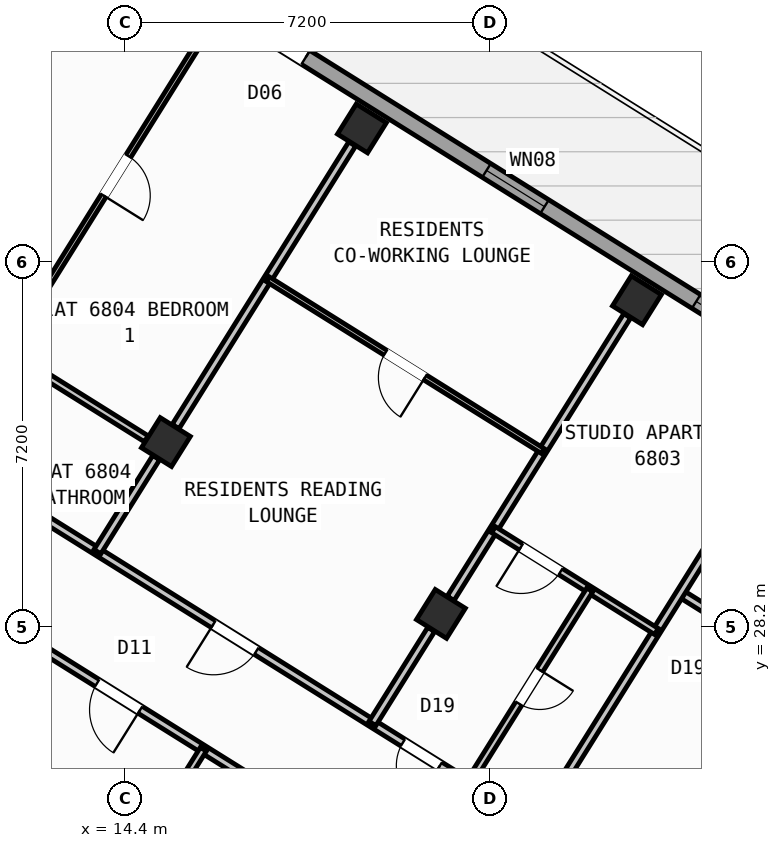
"""IFC4 building model, lengths in metres.
Left out: names, types, materials, properties, quantities, classifications, styles, units other than length and angle.
Written with IfcOpenShell. Run it as: python <this file> out.ifc"""

import sys

from ifc_helpers import new_model, si_unit, direction, frame, frame_2d, origin, origin_2d, place, context, subcontext, project, spatial, rectangle, hollow_rectangle, extrude, source, transform, mapped, element, fill, save


model = new_model("IFC4")
c1 = context("Model", 3, precision=1e-05, world=origin(), true_north=direction((0.0, 1.0)))
c2 = subcontext(c1, "Body", "Model", "MODEL_VIEW")
j1 = project(units=[si_unit("LENGTHUNIT", "METRE"), si_unit("PLANEANGLEUNIT", "RADIAN")], contexts=[c1])
p1 = place(None, origin())
s1 = spatial("IfcSite", under=j1, at=p1, CompositionType="ELEMENT")
p2 = place(p1, origin())
s2 = spatial("IfcBuilding", under=s1, at=p2, CompositionType="ELEMENT")
p3 = place(p2, frame((0.0, 0.0, 270.0)))
s3 = spatial("IfcBuildingStorey", under=s2, at=p3, CompositionType="ELEMENT", Elevation=270.0)
m1 = source(origin(), c2, "Body", "SweptSolid", [
    extrude(hollow_rectangle(XDim=0.7, YDim=0.7, WallThickness=0.028, at=origin_2d()), origin(), (0.0, 0.0, 1.0), 3.6),
])
for number, where, z_axis, x_axis in (
    (1, (24.5, 34.643, 0.0), (0.0, 0.0, 1.0), (-0.848, 0.53, 0.0)),
    (2, (20.632, 28.452, 0.0), (0.0, 0.0, 1.0), (-0.848, 0.53, 0.0)),
    (3, (19.073, 38.034, 0.0), (0.0, 0.0, 1.0), (-0.848, 0.53, 0.0)),
    (4, (15.205, 31.844, 0.0), (0.0, 0.0, 1.0), (-0.848, 0.53, 0.0)),
):
    element("IfcColumn", number, at=place(p3, frame(where, z_axis=z_axis, x_axis=x_axis)), inside=s3, PredefinedType="COLUMN", context=c2, shape_type="MappedRepresentation", body=[
        mapped(m1, transform((0.0, 0.0, 0.0), scale=1.0)),
    ])
p4 = place(p3, frame((2.415, 23.452, 0.0), z_axis=(0.0, 0.0, 1.0), x_axis=(0.52991049553, 0.848053575387, 0.0)))
e5 = element("IfcWall", 5, at=p4, inside=s3, PredefinedType="STANDARD", context=c2, shape_type="SweptSolid", body=[
    extrude(rectangle(XDim=21.587, YDim=0.32, at=frame_2d((10.794, 0.0))), origin(), (0.0, 0.0, 1.0), 2.875),
])
p5 = place(p4, frame((2.606, 0.0, 0.9)))
e6 = element("IfcOpeningElement", 6, at=p5, cuts=e5, PredefinedType="OPENING", context=c2, shape_type="SweptSolid", body=[
    extrude(rectangle(XDim=1.65, YDim=1.45, at=frame_2d((0.825, 0.725))), frame((0.0, 0.17, 0.0), z_axis=(0.0, -1.0, 0.0), x_axis=(1.0, 0.0, 0.0)), (0.0, 0.0, 1.0), 0.34),
])
p6 = place(p4, frame((7.504, 0.0, 1.0)))
e7 = element("IfcOpeningElement", 7, at=p6, cuts=e5, PredefinedType="OPENING", context=c2, shape_type="SweptSolid", body=[
    extrude(rectangle(XDim=0.9, YDim=1.25, at=frame_2d((0.45, 0.625))), frame((0.0, 0.17, 0.0), z_axis=(0.0, -1.0, 0.0), x_axis=(1.0, 0.0, 0.0)), (0.0, 0.0, 1.0), 0.34),
])
p7 = place(p4, frame((12.084, 0.0, 1.0)))
e8 = element("IfcOpeningElement", 8, at=p7, cuts=e5, PredefinedType="OPENING", context=c2, shape_type="SweptSolid", body=[
    extrude(rectangle(XDim=0.9, YDim=1.25, at=frame_2d((0.45, 0.625))), frame((0.0, 0.17, 0.0), z_axis=(0.0, -1.0, 0.0), x_axis=(1.0, 0.0, 0.0)), (0.0, 0.0, 1.0), 0.34),
])
p8 = place(p4, frame((15.619, 0.0, 1.0)))
e9 = element("IfcOpeningElement", 9, at=p8, cuts=e5, PredefinedType="OPENING", context=c2, shape_type="SweptSolid", body=[
    extrude(rectangle(XDim=0.9, YDim=1.25, at=frame_2d((0.45, 0.625))), frame((0.0, 0.17, 0.0), z_axis=(0.0, -1.0, 0.0), x_axis=(1.0, 0.0, 0.0)), (0.0, 0.0, 1.0), 0.34),
])
p9 = place(p4, frame((18.569, 0.0, 1.0)))
e10 = element("IfcOpeningElement", 10, at=p9, cuts=e5, PredefinedType="OPENING", context=c2, shape_type="SweptSolid", body=[
    extrude(rectangle(XDim=0.9, YDim=1.25, at=frame_2d((0.45, 0.625))), frame((0.0, 0.17, 0.0), z_axis=(0.0, -1.0, 0.0), x_axis=(1.0, 0.0, 0.0)), (0.0, 0.0, 1.0), 0.34),
])
p10 = place(p3, frame((14.138, 41.825, 0.0), z_axis=(0.0, 0.0, 1.0), x_axis=(0.848046498049, -0.529921821731, 0.0)))
e11 = element("IfcWall", 11, at=p10, inside=s3, PredefinedType="STANDARD", context=c2, shape_type="SweptSolid", body=[
    extrude(rectangle(XDim=31.588, YDim=0.32, at=frame_2d((15.794, 0.0))), origin(), (0.0, 0.0, 1.0), 3.35),
])
p11 = place(p10, frame((3.46, 0.0, 0.0)))
e12 = element("IfcOpeningElement", 12, at=p11, cuts=e11, PredefinedType="OPENING", context=c2, shape_type="SweptSolid", body=[
    extrude(rectangle(XDim=1.05, YDim=2.15, at=frame_2d((0.525, 1.075))), frame((0.0, 0.17, 0.0), z_axis=(0.0, -1.0, 0.0), x_axis=(1.0, 0.0, 0.0)), (0.0, 0.0, 1.0), 0.34),
])
p12 = place(p10, frame((0.831, 0.0, 1.0)))
e13 = element("IfcOpeningElement", 13, at=p12, cuts=e11, PredefinedType="OPENING", context=c2, shape_type="SweptSolid", body=[
    extrude(rectangle(XDim=0.9, YDim=1.25, at=frame_2d((0.45, 0.625))), frame((0.0, 0.17, 0.0), z_axis=(0.0, -1.0, 0.0), x_axis=(1.0, 0.0, 0.0)), (0.0, 0.0, 1.0), 0.34),
])
p13 = place(p10, frame((8.719, 0.0, 0.9)))
e14 = element("IfcOpeningElement", 14, at=p13, cuts=e11, PredefinedType="OPENING", context=c2, shape_type="SweptSolid", body=[
    extrude(rectangle(XDim=1.35, YDim=1.45, at=frame_2d((0.675, 0.725))), frame((0.0, 0.17, 0.0), z_axis=(0.0, -1.0, 0.0), x_axis=(1.0, 0.0, 0.0)), (0.0, 0.0, 1.0), 0.34),
])
p14 = place(p10, frame((13.599, 0.0, 0.95)))
e15 = element("IfcOpeningElement", 15, at=p14, cuts=e11, PredefinedType="OPENING", context=c2, shape_type="SweptSolid", body=[
    extrude(rectangle(XDim=1.95, YDim=1.35, at=frame_2d((0.975, 0.675))), frame((0.0, 0.17, 0.0), z_axis=(0.0, -1.0, 0.0), x_axis=(1.0, 0.0, 0.0)), (0.0, 0.0, 1.0), 0.34),
])
p15 = place(p10, frame((17.154, 0.0, 1.0)))
e16 = element("IfcOpeningElement", 16, at=p15, cuts=e11, PredefinedType="OPENING", context=c2, shape_type="SweptSolid", body=[
    extrude(rectangle(XDim=0.9, YDim=1.25, at=frame_2d((0.45, 0.625))), frame((0.0, 0.17, 0.0), z_axis=(0.0, -1.0, 0.0), x_axis=(1.0, 0.0, 0.0)), (0.0, 0.0, 1.0), 0.34),
])
p16 = place(p10, frame((21.719, 0.0, 0.9)))
e17 = element("IfcOpeningElement", 17, at=p16, cuts=e11, PredefinedType="OPENING", context=c2, shape_type="SweptSolid", body=[
    extrude(rectangle(XDim=1.65, YDim=1.45, at=frame_2d((0.825, 0.725))), frame((0.0, 0.17, 0.0), z_axis=(0.0, -1.0, 0.0), x_axis=(1.0, 0.0, 0.0)), (0.0, 0.0, 1.0), 0.34),
])
p17 = place(p10, frame((27.419, 0.0, 0.9)))
e18 = element("IfcOpeningElement", 18, at=p17, cuts=e11, PredefinedType="OPENING", context=c2, shape_type="SweptSolid", body=[
    extrude(rectangle(XDim=1.65, YDim=1.45, at=frame_2d((0.825, 0.725))), frame((0.0, 0.17, 0.0), z_axis=(0.0, -1.0, 0.0), x_axis=(1.0, 0.0, 0.0)), (0.0, 0.0, 1.0), 0.34),
])
p18 = place(p3, frame((27.57, 27.478, 0.0), z_axis=(0.0, 0.0, 1.0), x_axis=(-0.848050851465, 0.529914854792, 0.0)))
e19 = element("IfcWall", 19, at=p18, inside=s3, PredefinedType="PARTITIONING", context=c2, shape_type="SweptSolid", body=[
    extrude(rectangle(XDim=2.61, YDim=0.16, at=frame_2d((1.305, 0.0))), origin(), (0.0, 0.0, 1.0), 3.34),
])
p19 = place(p18, frame((0.95, 0.0, 0.0)))
e20 = element("IfcOpeningElement", 20, at=p19, cuts=e19, PredefinedType="OPENING", context=c2, shape_type="SweptSolid", body=[
    extrude(rectangle(XDim=0.86, YDim=2.05, at=frame_2d((0.43, 1.025))), frame((0.0, 0.09, 0.0), z_axis=(0.0, -1.0, 0.0), x_axis=(1.0, 0.0, 0.0)), (0.0, 0.0, 1.0), 0.18),
])
p20 = place(p3, frame((27.953, 33.016, 0.0), z_axis=(0.0, 0.0, 1.0), x_axis=(-0.529909450694, -0.848054228257, 0.0)))
e21 = element("IfcWall", 21, at=p20, inside=s3, PredefinedType="PARTITIONING", context=c2, shape_type="SweptSolid", body=[
    extrude(rectangle(XDim=10.3, YDim=0.16, at=frame_2d((5.15, 0.0))), origin(), (0.0, 0.0, 1.0), 3.34),
])
p21 = place(p3, frame((22.495, 24.281, 0.0), z_axis=(0.0, 0.0, 1.0), x_axis=(-0.848052408131, 0.529912363569, 0.0)))
e22 = element("IfcWall", 22, at=p21, inside=s3, PredefinedType="PARTITIONING", context=c2, shape_type="SweptSolid", body=[
    extrude(rectangle(XDim=16.73, YDim=0.16, at=frame_2d((8.365, 0.0))), origin(), (0.0, 0.0, 1.0), 3.34),
])
p22 = place(p21, frame((2.22, 0.0, 0.0)))
e23 = element("IfcOpeningElement", 23, at=p22, cuts=e22, PredefinedType="OPENING", context=c2, shape_type="SweptSolid", body=[
    extrude(rectangle(XDim=0.86, YDim=2.05, at=frame_2d((0.43, 1.025))), frame((0.0, 0.09, 0.0), z_axis=(0.0, -1.0, 0.0), x_axis=(1.0, 0.0, 0.0)), (0.0, 0.0, 1.0), 0.18),
])
p23 = place(p21, frame((6.49, 0.0, 0.0)))
e24 = element("IfcOpeningElement", 24, at=p23, cuts=e22, PredefinedType="OPENING", context=c2, shape_type="SweptSolid", body=[
    extrude(rectangle(XDim=1.0, YDim=2.1, at=frame_2d((0.5, 1.05))), frame((0.0, 0.09, 0.0), z_axis=(0.0, -1.0, 0.0), x_axis=(1.0, 0.0, 0.0)), (0.0, 0.0, 1.0), 0.18),
])
p24 = place(p21, frame((14.76, 0.0, 0.0)))
e25 = element("IfcOpeningElement", 25, at=p24, cuts=e22, PredefinedType="OPENING", context=c2, shape_type="SweptSolid", body=[
    extrude(rectangle(XDim=1.0, YDim=2.1, at=frame_2d((0.5, 1.05))), frame((0.0, 0.09, 0.0), z_axis=(0.0, -1.0, 0.0), x_axis=(1.0, 0.0, 0.0)), (0.0, 0.0, 1.0), 0.18),
])
p25 = place(p3, frame((21.329, 22.416, 0.0), z_axis=(0.0, 0.0, 1.0), x_axis=(-0.848052408131, 0.529912363569, 0.0)))
e26 = element("IfcWall", 26, at=p25, inside=s3, PredefinedType="PARTITIONING", context=c2, shape_type="SweptSolid", body=[
    extrude(rectangle(XDim=16.73, YDim=0.16, at=frame_2d((8.365, 0.0))), origin(), (0.0, 0.0, 1.0), 3.34),
])
p26 = place(p25, frame((1.395, 0.0, 0.0)))
e27 = element("IfcOpeningElement", 27, at=p26, cuts=e26, PredefinedType="OPENING", context=c2, shape_type="SweptSolid", body=[
    extrude(rectangle(XDim=1.0, YDim=2.1, at=frame_2d((0.5, 1.05))), frame((0.0, 0.09, 0.0), z_axis=(0.0, -1.0, 0.0), x_axis=(1.0, 0.0, 0.0)), (0.0, 0.0, 1.0), 0.18),
])
p27 = place(p25, frame((7.82, 0.0, 0.0)))
e28 = element("IfcOpeningElement", 28, at=p27, cuts=e26, PredefinedType="OPENING", context=c2, shape_type="SweptSolid", body=[
    extrude(rectangle(XDim=1.0, YDim=2.1, at=frame_2d((0.5, 1.05))), frame((0.0, 0.09, 0.0), z_axis=(0.0, -1.0, 0.0), x_axis=(1.0, 0.0, 0.0)), (0.0, 0.0, 1.0), 0.18),
])
p28 = place(p25, frame((11.14, 0.0, 0.0)))
e29 = element("IfcOpeningElement", 29, at=p28, cuts=e26, PredefinedType="OPENING", context=c2, shape_type="SweptSolid", body=[
    extrude(rectangle(XDim=1.0, YDim=2.1, at=frame_2d((0.5, 1.05))), frame((0.0, 0.09, 0.0), z_axis=(0.0, -1.0, 0.0), x_axis=(1.0, 0.0, 0.0)), (0.0, 0.0, 1.0), 0.18),
])
p29 = place(p3, frame((15.944, 25.781, 0.0), z_axis=(0.0, 0.0, 1.0), x_axis=(-0.529917480809, -0.848049210561, 0.0)))
e30 = element("IfcWall", 30, at=p29, inside=s3, PredefinedType="PLUMBINGWALL", context=c2, shape_type="SweptSolid", body=[
    extrude(rectangle(XDim=4.58, YDim=0.14, at=frame_2d((2.29, 0.0))), origin(), (0.0, 0.0, 1.0), 3.34),
])
p30 = place(p29, frame((1.9, 0.0, 0.0)))
e31 = element("IfcOpeningElement", 31, at=p30, cuts=e30, PredefinedType="OPENING", context=c2, shape_type="SweptSolid", body=[
    extrude(rectangle(XDim=0.78, YDim=2.05, at=frame_2d((0.39, 1.025))), frame((0.0, 0.08, 0.0), z_axis=(0.0, -1.0, 0.0), x_axis=(1.0, 0.0, 0.0)), (0.0, 0.0, 1.0), 0.16),
])
p31 = place(p3, frame((24.309, 34.336, 0.0), z_axis=(0.0, 0.0, 1.0), x_axis=(-0.529895484599, -0.848062954858, 0.0)))
e32 = element("IfcWall", 32, at=p31, inside=s3, PredefinedType="PARTITIONING", context=c2, shape_type="SweptSolid", body=[
    extrude(rectangle(XDim=6.576, YDim=0.16, at=frame_2d((3.288, 0.0))), origin(), (0.0, 0.0, 1.0), 2.875),
])
p32 = place(p3, frame((20.44, 28.145, 0.0), z_axis=(0.0, 0.0, 1.0), x_axis=(-0.5299186965, -0.848048450915, 0.0)))
e33 = element("IfcWall", 33, at=p32, inside=s3, PredefinedType="PARTITIONING", context=c2, shape_type="SweptSolid", body=[
    extrude(rectangle(XDim=2.188, YDim=0.16, at=frame_2d((1.094, 0.0))), origin(), (0.0, 0.0, 1.0), 2.875),
])
p33 = place(p3, frame((24.885, 28.106, 0.0), z_axis=(0.0, 0.0, 1.0), x_axis=(-0.848059820872, 0.529900500304, 0.0)))
e34 = element("IfcWall", 34, at=p33, inside=s3, PredefinedType="PLUMBINGWALL", context=c2, shape_type="SweptSolid", body=[
    extrude(rectangle(XDim=3.79, YDim=0.14, at=frame_2d((1.895, 0.0))), origin(), (0.0, 0.0, 1.0), 3.34),
])
p34 = place(p33, frame((2.23, 0.0, 0.0)))
e35 = element("IfcOpeningElement", 35, at=p34, cuts=e34, PredefinedType="OPENING", context=c2, shape_type="SweptSolid", body=[
    extrude(rectangle(XDim=0.92, YDim=2.08, at=frame_2d((0.46, 1.04))), frame((0.0, 0.08, 0.0), z_axis=(0.0, -1.0, 0.0), x_axis=(1.0, 0.0, 0.0)), (0.0, 0.0, 1.0), 0.16),
])
p35 = place(p3, frame((23.57, 28.927, 0.0), z_axis=(0.0, 0.0, 1.0), x_axis=(-0.529911350634, -0.84805304107, 0.0)))
e36 = element("IfcWall", 36, at=p35, inside=s3, PredefinedType="PLUMBINGWALL", context=c2, shape_type="SweptSolid", body=[
    extrude(rectangle(XDim=4.51, YDim=0.14, at=frame_2d((2.255, 0.0))), origin(), (0.0, 0.0, 1.0), 3.025),
])
p36 = place(p35, frame((1.865, 0.0, 0.0)))
e37 = element("IfcOpeningElement", 37, at=p36, cuts=e36, PredefinedType="OPENING", context=c2, shape_type="SweptSolid", body=[
    extrude(rectangle(XDim=0.78, YDim=2.05, at=frame_2d((0.39, 1.025))), frame((0.0, 0.08, 0.0), z_axis=(0.0, -1.0, 0.0), x_axis=(1.0, 0.0, 0.0)), (0.0, 0.0, 1.0), 0.16),
])
p37 = place(p3, frame((18.881, 37.727, 0.0), z_axis=(0.0, 0.0, 1.0), x_axis=(-0.529938869374, -0.84803584519, 0.0)))
e38 = element("IfcWall", 38, at=p37, inside=s3, PredefinedType="PARTITIONING", context=c2, shape_type="SweptSolid", body=[
    extrude(rectangle(XDim=6.576, YDim=0.16, at=frame_2d((3.288, 0.0))), origin(), (0.0, 0.0, 1.0), 2.875),
])
p38 = place(p3, frame((15.013, 31.537, 0.0), z_axis=(0.0, 0.0, 1.0), x_axis=(-0.5299186965, -0.848048450915, 0.0)))
e39 = element("IfcWall", 39, at=p38, inside=s3, PredefinedType="PARTITIONING", context=c2, shape_type="SweptSolid", body=[
    extrude(rectangle(XDim=2.188, YDim=0.16, at=frame_2d((1.094, 0.0))), origin(), (0.0, 0.0, 1.0), 2.875),
])
p39 = place(p3, frame((22.642, 31.668, 0.0), z_axis=(0.0, 0.0, 1.0), x_axis=(-0.84806687439, 0.529889211593, 0.0)))
e40 = element("IfcWall", 40, at=p39, inside=s3, PredefinedType="PARTITIONING", context=c2, shape_type="SweptSolid", body=[
    extrude(rectangle(XDim=6.4, YDim=0.11, at=frame_2d((3.2, 0.0))), origin(), (0.0, 0.0, 1.0), 3.34),
])
p40 = place(p39, frame((2.74, 0.0, 0.0)))
e41 = element("IfcOpeningElement", 41, at=p40, cuts=e40, PredefinedType="OPENING", context=c2, shape_type="SweptSolid", body=[
    extrude(rectangle(XDim=0.92, YDim=2.08, at=frame_2d((0.46, 1.04))), frame((0.0, 0.065, 0.0), z_axis=(0.0, -1.0, 0.0), x_axis=(1.0, 0.0, 0.0)), (0.0, 0.0, 1.0), 0.13),
])
p41 = place(p3, frame((16.385, 40.563, 0.0), z_axis=(0.0, 0.0, 1.0), x_axis=(-0.529924195719, -0.848045014602, 0.0)))
e42 = element("IfcWall", 42, at=p41, inside=s3, PredefinedType="PARTITIONING", context=c2, shape_type="SweptSolid", body=[
    extrude(rectangle(XDim=10.57, YDim=0.11, at=frame_2d((5.285, 0.0))), origin(), (0.0, 0.0, 1.0), 3.34),
])
p42 = place(p41, frame((8.93, 0.0, 0.0)))
e43 = element("IfcOpeningElement", 43, at=p42, cuts=e42, PredefinedType="OPENING", context=c2, shape_type="SweptSolid", body=[
    extrude(rectangle(XDim=0.78, YDim=2.05, at=frame_2d((0.39, 1.025))), frame((0.0, 0.065, 0.0), z_axis=(0.0, -1.0, 0.0), x_axis=(1.0, 0.0, 0.0)), (0.0, 0.0, 1.0), 0.13),
])
p43 = place(p41, frame((3.625, 0.0, 0.0)))
e44 = element("IfcOpeningElement", 44, at=p43, cuts=e42, PredefinedType="OPENING", context=c2, shape_type="SweptSolid", body=[
    extrude(rectangle(XDim=0.92, YDim=2.08, at=frame_2d((0.46, 1.04))), frame((0.0, 0.065, 0.0), z_axis=(0.0, -1.0, 0.0), x_axis=(1.0, 0.0, 0.0)), (0.0, 0.0, 1.0), 0.13),
])
p44 = place(p3, frame((14.818, 31.908, 0.0), z_axis=(0.0, 0.0, 1.0), x_axis=(-0.848036190178, 0.529938317305, 0.0)))
e45 = element("IfcWall", 45, at=p44, inside=s3, PredefinedType="PLUMBINGWALL", context=c2, shape_type="SweptSolid", body=[
    extrude(rectangle(XDim=3.258, YDim=0.14, at=frame_2d((1.629, 0.0))), origin(), (0.0, 0.0, 1.0), 2.875),
])
m2 = source(origin(), c2, "Body", "SweptSolid", [
    extrude(rectangle(XDim=1.05, YDim=2.15, at=frame_2d((0.525, 1.075))), frame((0.0, 0.025, 0.0), z_axis=(0.0, -1.0, 0.0), x_axis=(1.0, 0.0, 0.0)), (0.0, 0.0, 1.0), 0.05),
])
p45 = place(p11, origin())
e46 = element("IfcDoor", 46, at=p45, inside=s3, OperationType="SINGLE_SWING_RIGHT", PredefinedType="DOOR", context=c2, shape_type="MappedRepresentation", body=[
    mapped(m2, transform((0.0, 0.0, 0.0), scale=1.0)),
])
fill(e12, e46)
m3 = source(origin(), c2, "Body", "SweptSolid", [
    extrude(rectangle(XDim=1.35, YDim=1.45, at=frame_2d((0.675, 0.725))), frame((0.0, 0.03, 0.0), z_axis=(0.0, -1.0, 0.0), x_axis=(1.0, 0.0, 0.0)), (0.0, 0.0, 1.0), 0.06),
])
p46 = place(p13, origin())
e47 = element("IfcWindow", 47, at=p46, inside=s3, PartitioningType="SINGLE_PANEL", PredefinedType="WINDOW", context=c2, shape_type="MappedRepresentation", body=[
    mapped(m3, transform((0.0, 0.0, 0.0), scale=1.0)),
])
fill(e14, e47)
m4 = source(origin(), c2, "Body", "SweptSolid", [
    extrude(rectangle(XDim=1.95, YDim=1.35, at=frame_2d((0.975, 0.675))), frame((0.0, 0.03, 0.0), z_axis=(0.0, -1.0, 0.0), x_axis=(1.0, 0.0, 0.0)), (0.0, 0.0, 1.0), 0.06),
])
p47 = place(p14, origin())
e48 = element("IfcWindow", 48, at=p47, inside=s3, PartitioningType="SINGLE_PANEL", PredefinedType="WINDOW", context=c2, shape_type="MappedRepresentation", body=[
    mapped(m4, transform((0.0, 0.0, 0.0), scale=1.0)),
])
fill(e15, e48)
m5 = source(origin(), c2, "Body", "SweptSolid", [
    extrude(rectangle(XDim=1.0, YDim=2.1, at=frame_2d((0.5, 1.05))), frame((0.0, 0.025, 0.0), z_axis=(0.0, -1.0, 0.0), x_axis=(1.0, 0.0, 0.0)), (0.0, 0.0, 1.0), 0.05),
])
p48 = place(p27, origin())
e49 = element("IfcDoor", 49, at=p48, inside=s3, OperationType="SINGLE_SWING_LEFT", PredefinedType="DOOR", context=c2, shape_type="MappedRepresentation", body=[
    mapped(m5, transform((0.0, 0.0, 0.0), scale=1.0)),
])
fill(e28, e49)
m6 = source(origin(), c2, "Body", "SweptSolid", [
    extrude(rectangle(XDim=0.86, YDim=2.05, at=frame_2d((0.43, 1.025))), frame((0.0, 0.025, 0.0), z_axis=(0.0, -1.0, 0.0), x_axis=(1.0, 0.0, 0.0)), (0.0, 0.0, 1.0), 0.05),
])
p49 = place(p22, origin())
e50 = element("IfcDoor", 50, at=p49, inside=s3, OperationType="SINGLE_SWING_LEFT", PredefinedType="DOOR", context=c2, shape_type="MappedRepresentation", body=[
    mapped(m6, transform((0.0, 0.0, 0.0), scale=1.0)),
])
fill(e23, e50)
m7 = source(origin(), c2, "Body", "SweptSolid", [
    extrude(rectangle(XDim=0.92, YDim=2.08, at=frame_2d((0.46, 1.04))), frame((0.0, 0.025, 0.0), z_axis=(0.0, -1.0, 0.0), x_axis=(1.0, 0.0, 0.0)), (0.0, 0.0, 1.0), 0.05),
])
p50 = place(p34, origin())
e51 = element("IfcDoor", 51, at=p50, inside=s3, OperationType="SINGLE_SWING_RIGHT", PredefinedType="DOOR", context=c2, shape_type="MappedRepresentation", body=[
    mapped(m7, transform((0.0, 0.0, 0.0), scale=1.0)),
])
fill(e35, e51)
m8 = source(origin(), c2, "Body", "SweptSolid", [
    extrude(rectangle(XDim=0.78, YDim=2.05, at=frame_2d((0.39, 1.025))), frame((0.0, 0.025, 0.0), z_axis=(0.0, -1.0, 0.0), x_axis=(1.0, 0.0, 0.0)), (0.0, 0.0, 1.0), 0.05),
])
p51 = place(p36, origin())
e52 = element("IfcDoor", 52, at=p51, inside=s3, OperationType="SINGLE_SWING_LEFT", PredefinedType="DOOR", context=c2, shape_type="MappedRepresentation", body=[
    mapped(m8, transform((0.0, 0.0, 0.0), scale=1.0)),
])
fill(e37, e52)
p52 = place(p23, origin())
e53 = element("IfcDoor", 53, at=p52, inside=s3, OperationType="SINGLE_SWING_RIGHT", PredefinedType="DOOR", context=c2, shape_type="MappedRepresentation", body=[
    mapped(m5, transform((0.0, 0.0, 0.0), scale=1.0)),
])
fill(e24, e53)
p53 = place(p40, origin())
e54 = element("IfcDoor", 54, at=p53, inside=s3, OperationType="SINGLE_SWING_LEFT", PredefinedType="DOOR", context=c2, shape_type="MappedRepresentation", body=[
    mapped(m7, transform((0.0, 0.0, 0.0), scale=1.0)),
])
fill(e41, e54)
p54 = place(p43, origin())
e55 = element("IfcDoor", 55, at=p54, inside=s3, OperationType="SINGLE_SWING_RIGHT", PredefinedType="DOOR", context=c2, shape_type="MappedRepresentation", body=[
    mapped(m7, transform((0.0, 0.0, 0.0), scale=1.0)),
])
fill(e44, e55)
save(model, sys.argv[1])
